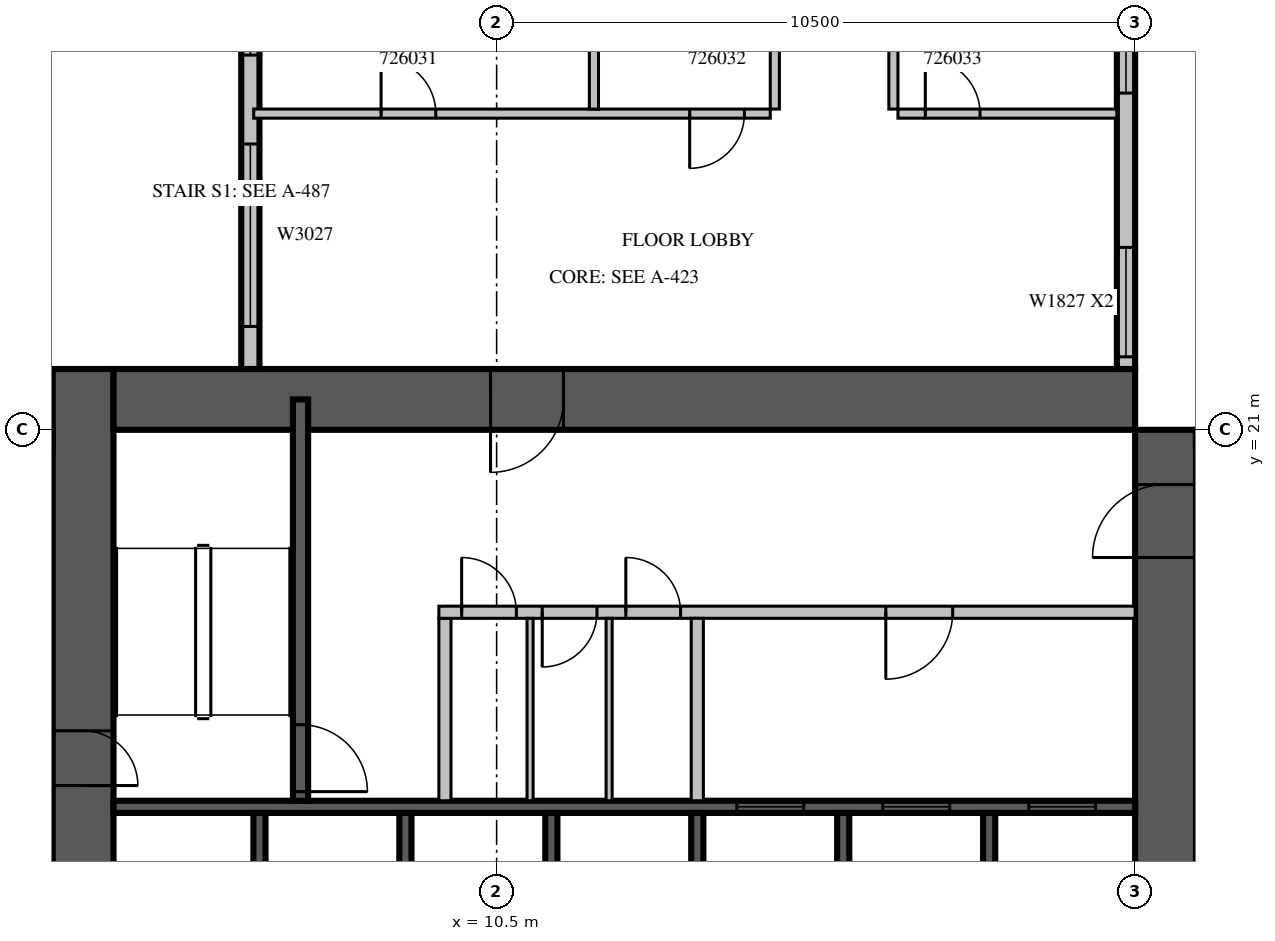
"""IFC4 building model, lengths in metres.
Left out: names, types, materials, properties, quantities, classifications, styles, units other than length and angle.
Written with IfcOpenShell. Run it as: python <this file> out.ifc"""

import sys

from ifc_helpers import new_model, si_unit, direction, frame, frame_2d, origin, place, context, subcontext, project, spatial, rectangle, extrude, source, transform, mapped, element, fill, save


model = new_model("IFC4")
c1 = context("Model", 3, precision=1e-05, world=origin(), true_north=direction((0.0, 1.0)))
c2 = subcontext(c1, "Body", "Model", "MODEL_VIEW")
j1 = project(units=[si_unit("LENGTHUNIT", "METRE"), si_unit("PLANEANGLEUNIT", "RADIAN")], contexts=[c1])
p1 = place(None, origin())
s1 = spatial("IfcSite", under=j1, at=p1, CompositionType="ELEMENT")
p2 = place(p1, origin())
s2 = spatial("IfcBuilding", under=s1, at=p2, CompositionType="ELEMENT")
p3 = place(p2, frame((0.0, 0.0, 120.3)))
s3 = spatial("IfcBuildingStorey", under=s2, at=p3, CompositionType="ELEMENT", Elevation=120.3)
m1 = source(origin(), c2, "Body", "SweptSolid", [
    extrude(rectangle(XDim=17.8, YDim=1.0, at=frame_2d((8.9, 0.0))), origin(), (0.0, 0.0, 1.0), 4.2),
])
p4 = place(p3, frame((3.7, 4.2, 0.0), z_axis=(0.0, 0.0, 1.0), x_axis=(0.0, 1.0, 0.0)))
e1 = element("IfcWall", 1, at=p4, inside=s3, PredefinedType="SHEAR", context=c2, shape_type="MappedRepresentation", body=[
    mapped(m1, transform((0.0, 0.0, 0.0), scale=1.0)),
])
m2 = source(origin(), c2, "Body", "SweptSolid", [
    extrude(rectangle(XDim=2.2, YDim=2.1, at=frame_2d((1.1, 1.05))), frame((0.0, 0.51, 0.0), z_axis=(0.0, -1.0, 0.0), x_axis=(1.0, 0.0, 0.0)), (0.0, 0.0, 1.0), 1.02),
])
p5 = place(p4, frame((4.2, 0.0, 0.0)))
e2 = element("IfcOpeningElement", 2, at=p5, cuts=e1, PredefinedType="OPENING", context=c2, shape_type="MappedRepresentation", body=[
    mapped(m2, transform((0.0, 0.0, 0.0), scale=1.0)),
])
m3 = source(origin(), c2, "Body", "SweptSolid", [
    extrude(rectangle(XDim=0.9, YDim=2.1, at=frame_2d((0.45, 1.05))), frame((0.0, 0.51, 0.0), z_axis=(0.0, -1.0, 0.0), x_axis=(1.0, 0.0, 0.0)), (0.0, 0.0, 1.0), 1.02),
])
p6 = place(p4, frame((10.95, 0.0, 0.0)))
e3 = element("IfcOpeningElement", 3, at=p6, cuts=e1, PredefinedType="OPENING", context=c2, shape_type="MappedRepresentation", body=[
    mapped(m3, transform((0.0, 0.0, 0.0), scale=1.0)),
])
m4 = source(origin(), c2, "Body", "SweptSolid", [
    extrude(rectangle(XDim=16.8, YDim=1.0, at=frame_2d((8.4, 0.0))), origin(), (0.0, 0.0, 1.0), 4.2),
])
p7 = place(p3, frame((21.5, 4.2, 0.0), z_axis=(0.0, 0.0, 1.0), x_axis=(0.0, 1.0, 0.0)))
e4 = element("IfcWall", 4, at=p7, inside=s3, PredefinedType="SHEAR", context=c2, shape_type="MappedRepresentation", body=[
    mapped(m4, transform((0.0, 0.0, 0.0), scale=1.0)),
])
p8 = place(p7, frame((4.2, 0.0, 0.0)))
e5 = element("IfcOpeningElement", 5, at=p8, cuts=e4, PredefinedType="OPENING", context=c2, shape_type="MappedRepresentation", body=[
    mapped(m2, transform((0.0, 0.0, 0.0), scale=1.0)),
])
m5 = source(origin(), c2, "Body", "SweptSolid", [
    extrude(rectangle(XDim=1.2, YDim=2.1, at=frame_2d((0.6, 1.05))), frame((0.0, 0.51, 0.0), z_axis=(0.0, -1.0, 0.0), x_axis=(1.0, 0.0, 0.0)), (0.0, 0.0, 1.0), 1.02),
])
p9 = place(p7, frame((14.7, 0.0, 0.0)))
e6 = element("IfcOpeningElement", 6, at=p9, cuts=e4, PredefinedType="OPENING", context=c2, shape_type="MappedRepresentation", body=[
    mapped(m5, transform((0.0, 0.0, 0.0), scale=1.0)),
])
p10 = place(p3, frame((4.2, 21.5, 0.0), z_axis=(0.0, 0.0, 1.0), x_axis=(1.0, 0.0, 0.0)))
e7 = element("IfcWall", 7, at=p10, inside=s3, PredefinedType="SHEAR", context=c2, shape_type="MappedRepresentation", body=[
    mapped(m4, transform((0.0, 0.0, 0.0), scale=1.0)),
])
p11 = place(p10, frame((6.2, 0.0, 0.0)))
e8 = element("IfcOpeningElement", 8, at=p11, cuts=e7, PredefinedType="OPENING", context=c2, shape_type="MappedRepresentation", body=[
    mapped(m5, transform((0.0, 0.0, 0.0), scale=1.0)),
])
m6 = source(origin(), c2, "Body", "SweptSolid", [
    extrude(rectangle(XDim=6.875, YDim=0.3, at=frame_2d((3.438, 0.0))), origin(), (0.0, 0.0, 1.0), 3.8),
])
p12 = place(p3, frame((20.85, 22.0, 0.0), z_axis=(0.0, 0.0, 1.0), x_axis=(0.0, 1.0, 0.0)))
e9 = element("IfcWall", 9, at=p12, inside=s3, PredefinedType="STANDARD", context=c2, shape_type="MappedRepresentation", body=[
    mapped(m6, transform((0.0, 0.0, 0.0), scale=1.0)),
])
m7 = source(origin(), c2, "Body", "SweptSolid", [
    extrude(rectangle(XDim=1.8, YDim=2.7, at=frame_2d((0.9, 1.35))), frame((0.0, 0.16, 0.0), z_axis=(0.0, -1.0, 0.0), x_axis=(1.0, 0.0, 0.0)), (0.0, 0.0, 1.0), 0.32),
])
p13 = place(p12, frame((0.2, 0.0, 0.6)))
e10 = element("IfcOpeningElement", 10, at=p13, cuts=e9, PredefinedType="OPENING", context=c2, shape_type="MappedRepresentation", body=[
    mapped(m7, transform((0.0, 0.0, 0.0), scale=1.0)),
])
p14 = place(p12, frame((4.537, 0.0, 0.6)))
e11 = element("IfcOpeningElement", 11, at=p14, cuts=e9, PredefinedType="OPENING", context=c2, shape_type="MappedRepresentation", body=[
    mapped(m7, transform((0.0, 0.0, 0.0), scale=1.0)),
])
m8 = source(origin(), c2, "Body", "SweptSolid", [
    extrude(rectangle(XDim=8.4, YDim=0.3, at=frame_2d((4.2, 0.0))), origin(), (0.0, 0.0, 1.0), 3.8),
])
p15 = place(p3, frame((6.45, 30.4, 0.0), z_axis=(0.0, 0.0, 1.0), x_axis=(0.0, -1.0, 0.0)))
e12 = element("IfcWall", 12, at=p15, inside=s3, PredefinedType="STANDARD", context=c2, shape_type="MappedRepresentation", body=[
    mapped(m8, transform((0.0, 0.0, 0.0), scale=1.0)),
])
p16 = place(p15, frame((1.438, 0.0, 0.6)))
e13 = element("IfcOpeningElement", 13, at=p16, cuts=e12, PredefinedType="OPENING", context=c2, shape_type="MappedRepresentation", body=[
    mapped(m7, transform((0.0, 0.0, 0.0), scale=1.0)),
])
m9 = source(origin(), c2, "Body", "SweptSolid", [
    extrude(rectangle(XDim=3.0, YDim=2.7, at=frame_2d((1.5, 1.35))), frame((0.0, 0.16, 0.0), z_axis=(0.0, -1.0, 0.0), x_axis=(1.0, 0.0, 0.0)), (0.0, 0.0, 1.0), 0.32),
])
p17 = place(p15, frame((4.7, 0.0, 0.6)))
e14 = element("IfcOpeningElement", 14, at=p17, cuts=e12, PredefinedType="OPENING", context=c2, shape_type="MappedRepresentation", body=[
    mapped(m9, transform((0.0, 0.0, 0.0), scale=1.0)),
])
m10 = source(origin(), c2, "Body", "SweptSolid", [
    extrude(rectangle(XDim=3.0, YDim=0.2, at=frame_2d((1.5, 0.0))), origin(), (0.0, 0.0, 1.0), 4.2),
])
for number, where, z_axis, x_axis in (
    (15, (6.6, 11.7, 0.0), (0.0, 0.0, 1.0), (0.0, 1.0, 0.0)),
    (16, (9.0, 11.7, 0.0), (0.0, 0.0, 1.0), (0.0, 1.0, 0.0)),
    (17, (11.4, 11.7, 0.0), (0.0, 0.0, 1.0), (0.0, 1.0, 0.0)),
    (18, (13.8, 11.7, 0.0), (0.0, 0.0, 1.0), (0.0, 1.0, 0.0)),
    (19, (16.2, 11.7, 0.0), (0.0, 0.0, 1.0), (0.0, 1.0, 0.0)),
    (20, (18.6, 11.7, 0.0), (0.0, 0.0, 1.0), (0.0, 1.0, 0.0)),
):
    element("IfcWall", number, at=place(p3, frame(where, z_axis=z_axis, x_axis=x_axis)), inside=s3, PredefinedType="SOLIDWALL", context=c2, shape_type="MappedRepresentation", body=[
        mapped(m10, transform((0.0, 0.0, 0.0), scale=1.0)),
    ])
m11 = source(origin(), c2, "Body", "SweptSolid", [
    extrude(rectangle(XDim=16.8, YDim=0.2, at=frame_2d((8.4, 0.0))), origin(), (0.0, 0.0, 1.0), 4.2),
])
p18 = place(p3, frame((4.2, 14.8, 0.0), z_axis=(0.0, 0.0, 1.0), x_axis=(1.0, 0.0, 0.0)))
e21 = element("IfcWall", 21, at=p18, inside=s3, PredefinedType="SOLIDWALL", context=c2, shape_type="MappedRepresentation", body=[
    mapped(m11, transform((0.0, 0.0, 0.0), scale=1.0)),
])
m12 = source(origin(), c2, "Body", "SweptSolid", [
    extrude(rectangle(XDim=1.1, YDim=2.1, at=frame_2d((0.55, 1.05))), frame((0.0, 0.11, 0.0), z_axis=(0.0, -1.0, 0.0), x_axis=(1.0, 0.0, 0.0)), (0.0, 0.0, 1.0), 0.22),
])
p19 = place(p18, frame((10.25, 0.0, 0.0)))
e22 = element("IfcOpeningElement", 22, at=p19, cuts=e21, PredefinedType="OPENING", context=c2, shape_type="MappedRepresentation", body=[
    mapped(m12, transform((0.0, 0.0, 0.0), scale=1.0)),
])
p20 = place(p18, frame((12.65, 0.0, 0.0)))
e23 = element("IfcOpeningElement", 23, at=p20, cuts=e21, PredefinedType="OPENING", context=c2, shape_type="MappedRepresentation", body=[
    mapped(m12, transform((0.0, 0.0, 0.0), scale=1.0)),
])
p21 = place(p18, frame((15.05, 0.0, 0.0)))
e24 = element("IfcOpeningElement", 24, at=p21, cuts=e21, PredefinedType="OPENING", context=c2, shape_type="MappedRepresentation", body=[
    mapped(m12, transform((0.0, 0.0, 0.0), scale=1.0)),
])
m13 = source(origin(), c2, "Body", "SweptSolid", [
    extrude(rectangle(XDim=6.6, YDim=0.25, at=frame_2d((3.3, 0.0))), origin(), (0.0, 0.0, 1.0), 3.8),
])
p22 = place(p3, frame((7.275, 14.9, 0.0), z_axis=(0.0, 0.0, 1.0), x_axis=(0.0, 1.0, 0.0)))
e25 = element("IfcWall", 25, at=p22, inside=s3, PredefinedType="SOLIDWALL", context=c2, shape_type="MappedRepresentation", body=[
    mapped(m13, transform((0.0, 0.0, 0.0), scale=1.0)),
])
m14 = source(origin(), c2, "Body", "SweptSolid", [
    extrude(rectangle(XDim=1.1, YDim=2.1, at=frame_2d((0.55, 1.05))), frame((0.0, 0.135, 0.0), z_axis=(0.0, -1.0, 0.0), x_axis=(1.0, 0.0, 0.0)), (0.0, 0.0, 1.0), 0.27),
])
p23 = place(p22, frame((0.15, 0.0, 0.0)))
e26 = element("IfcOpeningElement", 26, at=p23, cuts=e25, PredefinedType="OPENING", context=c2, shape_type="MappedRepresentation", body=[
    mapped(m14, transform((0.0, 0.0, 0.0), scale=1.0)),
])
m15 = source(origin(), c2, "Body", "SweptSolid", [
    extrude(rectangle(XDim=3.0, YDim=0.2, at=frame_2d((1.5, 0.0))), origin(), (0.0, 0.0, 1.0), 3.8),
])
p24 = place(p3, frame((9.65, 14.9, 0.0), z_axis=(0.0, 0.0, 1.0), x_axis=(0.0, 1.0, 0.0)))
e27 = element("IfcWall", 27, at=p24, inside=s3, PredefinedType="PARTITIONING", context=c2, shape_type="MappedRepresentation", body=[
    mapped(m15, transform((0.0, 0.0, 0.0), scale=1.0)),
])
m16 = source(origin(), c2, "Body", "SweptSolid", [
    extrude(rectangle(XDim=11.45, YDim=0.2, at=frame_2d((5.725, 0.0))), origin(), (0.0, 0.0, 1.0), 3.8),
])
p25 = place(p3, frame((9.55, 18.0, 0.0), z_axis=(0.0, 0.0, 1.0), x_axis=(1.0, 0.0, 0.0)))
e28 = element("IfcWall", 28, at=p25, inside=s3, PredefinedType="PARTITIONING", context=c2, shape_type="MappedRepresentation", body=[
    mapped(m16, transform((0.0, 0.0, 0.0), scale=1.0)),
])
m17 = source(origin(), c2, "Body", "SweptSolid", [
    extrude(rectangle(XDim=0.9, YDim=2.1, at=frame_2d((0.45, 1.05))), frame((0.0, 0.11, 0.0), z_axis=(0.0, -1.0, 0.0), x_axis=(1.0, 0.0, 0.0)), (0.0, 0.0, 1.0), 0.22),
])
p26 = place(p25, frame((0.375, 0.0, 0.0)))
e29 = element("IfcOpeningElement", 29, at=p26, cuts=e28, PredefinedType="OPENING", context=c2, shape_type="MappedRepresentation", body=[
    mapped(m17, transform((0.0, 0.0, 0.0), scale=1.0)),
])
p27 = place(p25, frame((1.7, 0.0, 0.0)))
e30 = element("IfcOpeningElement", 30, at=p27, cuts=e28, PredefinedType="OPENING", context=c2, shape_type="MappedRepresentation", body=[
    mapped(m17, transform((0.0, 0.0, 0.0), scale=1.0)),
])
p28 = place(p25, frame((3.075, 0.0, 0.0)))
e31 = element("IfcOpeningElement", 31, at=p28, cuts=e28, PredefinedType="OPENING", context=c2, shape_type="MappedRepresentation", body=[
    mapped(m17, transform((0.0, 0.0, 0.0), scale=1.0)),
])
p29 = place(p25, frame((7.35, 0.0, 0.0)))
e32 = element("IfcOpeningElement", 32, at=p29, cuts=e28, PredefinedType="OPENING", context=c2, shape_type="MappedRepresentation", body=[
    mapped(m12, transform((0.0, 0.0, 0.0), scale=1.0)),
])
p30 = place(p3, frame((13.8, 14.9, 0.0), z_axis=(0.0, 0.0, 1.0), x_axis=(0.0, 1.0, 0.0)))
e33 = element("IfcWall", 33, at=p30, inside=s3, PredefinedType="PARTITIONING", context=c2, shape_type="MappedRepresentation", body=[
    mapped(m15, transform((0.0, 0.0, 0.0), scale=1.0)),
])
m18 = source(origin(), c2, "Body", "SweptSolid", [
    extrude(rectangle(XDim=3.0, YDim=0.1, at=frame_2d((1.5, 0.0))), origin(), (0.0, 0.0, 1.0), 3.8),
])
for number, where, z_axis, x_axis in (
    (34, (11.05, 14.9, 0.0), (0.0, 0.0, 1.0), (0.0, 1.0, 0.0)),
    (35, (12.35, 14.9, 0.0), (0.0, 0.0, 1.0), (0.0, 1.0, 0.0)),
):
    element("IfcWall", number, at=place(p3, frame(where, z_axis=z_axis, x_axis=x_axis)), inside=s3, PredefinedType="PARTITIONING", context=c2, shape_type="MappedRepresentation", body=[
        mapped(m18, transform((0.0, 0.0, 0.0), scale=1.0)),
    ])
m19 = source(origin(), c2, "Body", "SweptSolid", [
    extrude(rectangle(XDim=8.495, YDim=0.15, at=frame_2d((4.247, 0.0))), origin(), (0.0, 0.0, 1.0), 3.8),
])
p31 = place(p3, frame((6.505, 26.2, 0.0), z_axis=(0.0, 0.0, 1.0), x_axis=(1.0, 0.0, 0.0)))
e36 = element("IfcWall", 36, at=p31, inside=s3, PredefinedType="PARTITIONING", context=c2, shape_type="MappedRepresentation", body=[
    mapped(m19, transform((0.0, 0.0, 0.0), scale=1.0)),
])
m20 = source(origin(), c2, "Body", "SweptSolid", [
    extrude(rectangle(XDim=0.9, YDim=2.1, at=frame_2d((0.45, 1.05))), frame((0.0, 0.085, 0.0), z_axis=(0.0, -1.0, 0.0), x_axis=(1.0, 0.0, 0.0)), (0.0, 0.0, 1.0), 0.17),
])
p32 = place(p31, frame((2.095, 0.0, 0.0)))
e37 = element("IfcOpeningElement", 37, at=p32, cuts=e36, PredefinedType="OPENING", context=c2, shape_type="MappedRepresentation", body=[
    mapped(m20, transform((0.0, 0.0, 0.0), scale=1.0)),
])
p33 = place(p31, frame((7.17, 0.0, 0.0)))
e38 = element("IfcOpeningElement", 38, at=p33, cuts=e36, PredefinedType="OPENING", context=c2, shape_type="MappedRepresentation", body=[
    mapped(m20, transform((0.0, 0.0, 0.0), scale=1.0)),
])
m21 = source(origin(), c2, "Body", "SweptSolid", [
    extrude(rectangle(XDim=3.6, YDim=0.15, at=frame_2d((1.8, 0.0))), origin(), (0.0, 0.0, 1.0), 3.8),
])
p34 = place(p3, frame((17.1, 26.2, 0.0), z_axis=(0.0, 0.0, 1.0), x_axis=(1.0, 0.0, 0.0)))
e39 = element("IfcWall", 39, at=p34, inside=s3, PredefinedType="PARTITIONING", context=c2, shape_type="MappedRepresentation", body=[
    mapped(m21, transform((0.0, 0.0, 0.0), scale=1.0)),
])
p35 = place(p34, frame((0.45, 0.0, 0.0)))
e40 = element("IfcOpeningElement", 40, at=p35, cuts=e39, PredefinedType="OPENING", context=c2, shape_type="MappedRepresentation", body=[
    mapped(m20, transform((0.0, 0.0, 0.0), scale=1.0)),
])
m22 = source(origin(), c2, "Body", "SweptSolid", [
    extrude(rectangle(XDim=3.05, YDim=0.15, at=frame_2d((1.525, 0.0))), origin(), (0.0, 0.0, 1.0), 3.8),
])
for number, where, z_axis, x_axis in (
    (41, (12.1, 26.275, 0.0), (0.0, 0.0, 1.0), (0.0, 1.0, 0.0)),
    (42, (15.075, 26.275, 0.0), (0.0, 0.0, 1.0), (0.0, 1.0, 0.0)),
    (43, (17.025, 29.325, 0.0), (0.0, 0.0, 1.0), (0.0, -1.0, 0.0)),
):
    element("IfcWall", number, at=place(p3, frame(where, z_axis=z_axis, x_axis=x_axis)), inside=s3, PredefinedType="PARTITIONING", context=c2, shape_type="MappedRepresentation", body=[
        mapped(m22, transform((0.0, 0.0, 0.0), scale=1.0)),
    ])
m23 = source(origin(), c2, "Body", "SweptSolid", [
    extrude(rectangle(XDim=1.8, YDim=2.7, at=frame_2d((0.9, 1.35))), frame((0.0, 0.03, 0.0), z_axis=(0.0, -1.0, 0.0), x_axis=(1.0, 0.0, 0.0)), (0.0, 0.0, 1.0), 0.06),
])
p36 = place(p13, origin())
e44 = element("IfcWindow", 44, at=p36, inside=s3, PartitioningType="SINGLE_PANEL", PredefinedType="WINDOW", context=c2, shape_type="MappedRepresentation", body=[
    mapped(m23, transform((0.0, 0.0, 0.0), scale=1.0)),
])
fill(e10, e44)
p37 = place(p14, origin())
e45 = element("IfcWindow", 45, at=p37, inside=s3, PartitioningType="SINGLE_PANEL", PredefinedType="WINDOW", context=c2, shape_type="MappedRepresentation", body=[
    mapped(m23, transform((0.0, 0.0, 0.0), scale=1.0)),
])
fill(e11, e45)
p38 = place(p16, origin())
e46 = element("IfcWindow", 46, at=p38, inside=s3, PartitioningType="SINGLE_PANEL", PredefinedType="WINDOW", context=c2, shape_type="MappedRepresentation", body=[
    mapped(m23, transform((0.0, 0.0, 0.0), scale=1.0)),
])
fill(e13, e46)
m24 = source(origin(), c2, "Body", "SweptSolid", [
    extrude(rectangle(XDim=3.0, YDim=2.7, at=frame_2d((1.5, 1.35))), frame((0.0, 0.03, 0.0), z_axis=(0.0, -1.0, 0.0), x_axis=(1.0, 0.0, 0.0)), (0.0, 0.0, 1.0), 0.06),
])
p39 = place(p17, origin())
e47 = element("IfcWindow", 47, at=p39, inside=s3, PartitioningType="SINGLE_PANEL", PredefinedType="WINDOW", context=c2, shape_type="MappedRepresentation", body=[
    mapped(m24, transform((0.0, 0.0, 0.0), scale=1.0)),
])
fill(e14, e47)
m25 = source(origin(), c2, "Body", "SweptSolid", [
    extrude(rectangle(XDim=1.1, YDim=2.1, at=frame_2d((0.55, 1.05))), frame((0.0, 0.025, 0.0), z_axis=(0.0, -1.0, 0.0), x_axis=(1.0, 0.0, 0.0)), (0.0, 0.0, 1.0), 0.05),
])
p40 = place(p19, origin())
e48 = element("IfcDoor", 48, at=p40, inside=s3, OperationType="SLIDING_TO_LEFT", PredefinedType="DOOR", context=c2, shape_type="MappedRepresentation", body=[
    mapped(m25, transform((0.0, 0.0, 0.0), scale=1.0)),
])
fill(e22, e48)
p41 = place(p20, origin())
e49 = element("IfcDoor", 49, at=p41, inside=s3, OperationType="SLIDING_TO_LEFT", PredefinedType="DOOR", context=c2, shape_type="MappedRepresentation", body=[
    mapped(m25, transform((0.0, 0.0, 0.0), scale=1.0)),
])
fill(e23, e49)
p42 = place(p21, origin())
e50 = element("IfcDoor", 50, at=p42, inside=s3, OperationType="SLIDING_TO_LEFT", PredefinedType="DOOR", context=c2, shape_type="MappedRepresentation", body=[
    mapped(m25, transform((0.0, 0.0, 0.0), scale=1.0)),
])
fill(e24, e50)
p43 = place(p23, origin())
e51 = element("IfcDoor", 51, at=p43, inside=s3, OperationType="SINGLE_SWING_RIGHT", PredefinedType="DOOR", context=c2, shape_type="MappedRepresentation", body=[
    mapped(m25, transform((0.0, 0.0, 0.0), scale=1.0)),
])
fill(e26, e51)
m26 = source(origin(), c2, "Body", "SweptSolid", [
    extrude(rectangle(XDim=0.9, YDim=2.1, at=frame_2d((0.45, 1.05))), frame((0.0, 0.025, 0.0), z_axis=(0.0, -1.0, 0.0), x_axis=(1.0, 0.0, 0.0)), (0.0, 0.0, 1.0), 0.05),
])
p44 = place(p26, origin())
e52 = element("IfcDoor", 52, at=p44, inside=s3, OperationType="SINGLE_SWING_LEFT", PredefinedType="DOOR", context=c2, shape_type="MappedRepresentation", body=[
    mapped(m26, transform((0.0, 0.0, 0.0), scale=1.0)),
])
fill(e29, e52)
p45 = place(p27, origin())
e53 = element("IfcDoor", 53, at=p45, inside=s3, OperationType="SINGLE_SWING_RIGHT", PredefinedType="DOOR", context=c2, shape_type="MappedRepresentation", body=[
    mapped(m26, transform((0.0, 0.0, 0.0), scale=1.0)),
])
fill(e30, e53)
p46 = place(p28, origin())
e54 = element("IfcDoor", 54, at=p46, inside=s3, OperationType="SINGLE_SWING_LEFT", PredefinedType="DOOR", context=c2, shape_type="MappedRepresentation", body=[
    mapped(m26, transform((0.0, 0.0, 0.0), scale=1.0)),
])
fill(e31, e54)
p47 = place(p29, origin())
e55 = element("IfcDoor", 55, at=p47, inside=s3, OperationType="SINGLE_SWING_RIGHT", PredefinedType="DOOR", context=c2, shape_type="MappedRepresentation", body=[
    mapped(m25, transform((0.0, 0.0, 0.0), scale=1.0)),
])
fill(e32, e55)
m27 = source(origin(), c2, "Body", "SweptSolid", [
    extrude(rectangle(XDim=1.2, YDim=2.1, at=frame_2d((0.6, 1.05))), frame((0.0, 0.025, 0.0), z_axis=(0.0, -1.0, 0.0), x_axis=(1.0, 0.0, 0.0)), (0.0, 0.0, 1.0), 0.05),
])
p48 = place(p11, origin())
e56 = element("IfcDoor", 56, at=p48, inside=s3, OperationType="SINGLE_SWING_RIGHT", PredefinedType="DOOR", context=c2, shape_type="MappedRepresentation", body=[
    mapped(m27, transform((0.0, 0.0, 0.0), scale=1.0)),
])
fill(e8, e56)
p49 = place(p9, origin())
e57 = element("IfcDoor", 57, at=p49, inside=s3, OperationType="SINGLE_SWING_LEFT", PredefinedType="DOOR", context=c2, shape_type="MappedRepresentation", body=[
    mapped(m27, transform((0.0, 0.0, 0.0), scale=1.0)),
])
fill(e6, e57)
p50 = place(p6, origin())
e58 = element("IfcDoor", 58, at=p50, inside=s3, OperationType="SINGLE_SWING_RIGHT", PredefinedType="DOOR", context=c2, shape_type="MappedRepresentation", body=[
    mapped(m26, transform((0.0, 0.0, 0.0), scale=1.0)),
])
fill(e3, e58)
p51 = place(p32, origin())
e59 = element("IfcDoor", 59, at=p51, inside=s3, OperationType="SINGLE_SWING_LEFT", PredefinedType="DOOR", context=c2, shape_type="MappedRepresentation", body=[
    mapped(m26, transform((0.0, 0.0, 0.0), scale=1.0)),
])
fill(e37, e59)
p52 = place(p33, origin())
e60 = element("IfcDoor", 60, at=p52, inside=s3, OperationType="SINGLE_SWING_RIGHT", PredefinedType="DOOR", context=c2, shape_type="MappedRepresentation", body=[
    mapped(m26, transform((0.0, 0.0, 0.0), scale=1.0)),
])
fill(e38, e60)
p53 = place(p35, origin())
e61 = element("IfcDoor", 61, at=p53, inside=s3, OperationType="SINGLE_SWING_LEFT", PredefinedType="DOOR", context=c2, shape_type="MappedRepresentation", body=[
    mapped(m26, transform((0.0, 0.0, 0.0), scale=1.0)),
])
fill(e40, e61)
save(model, sys.argv[1])
